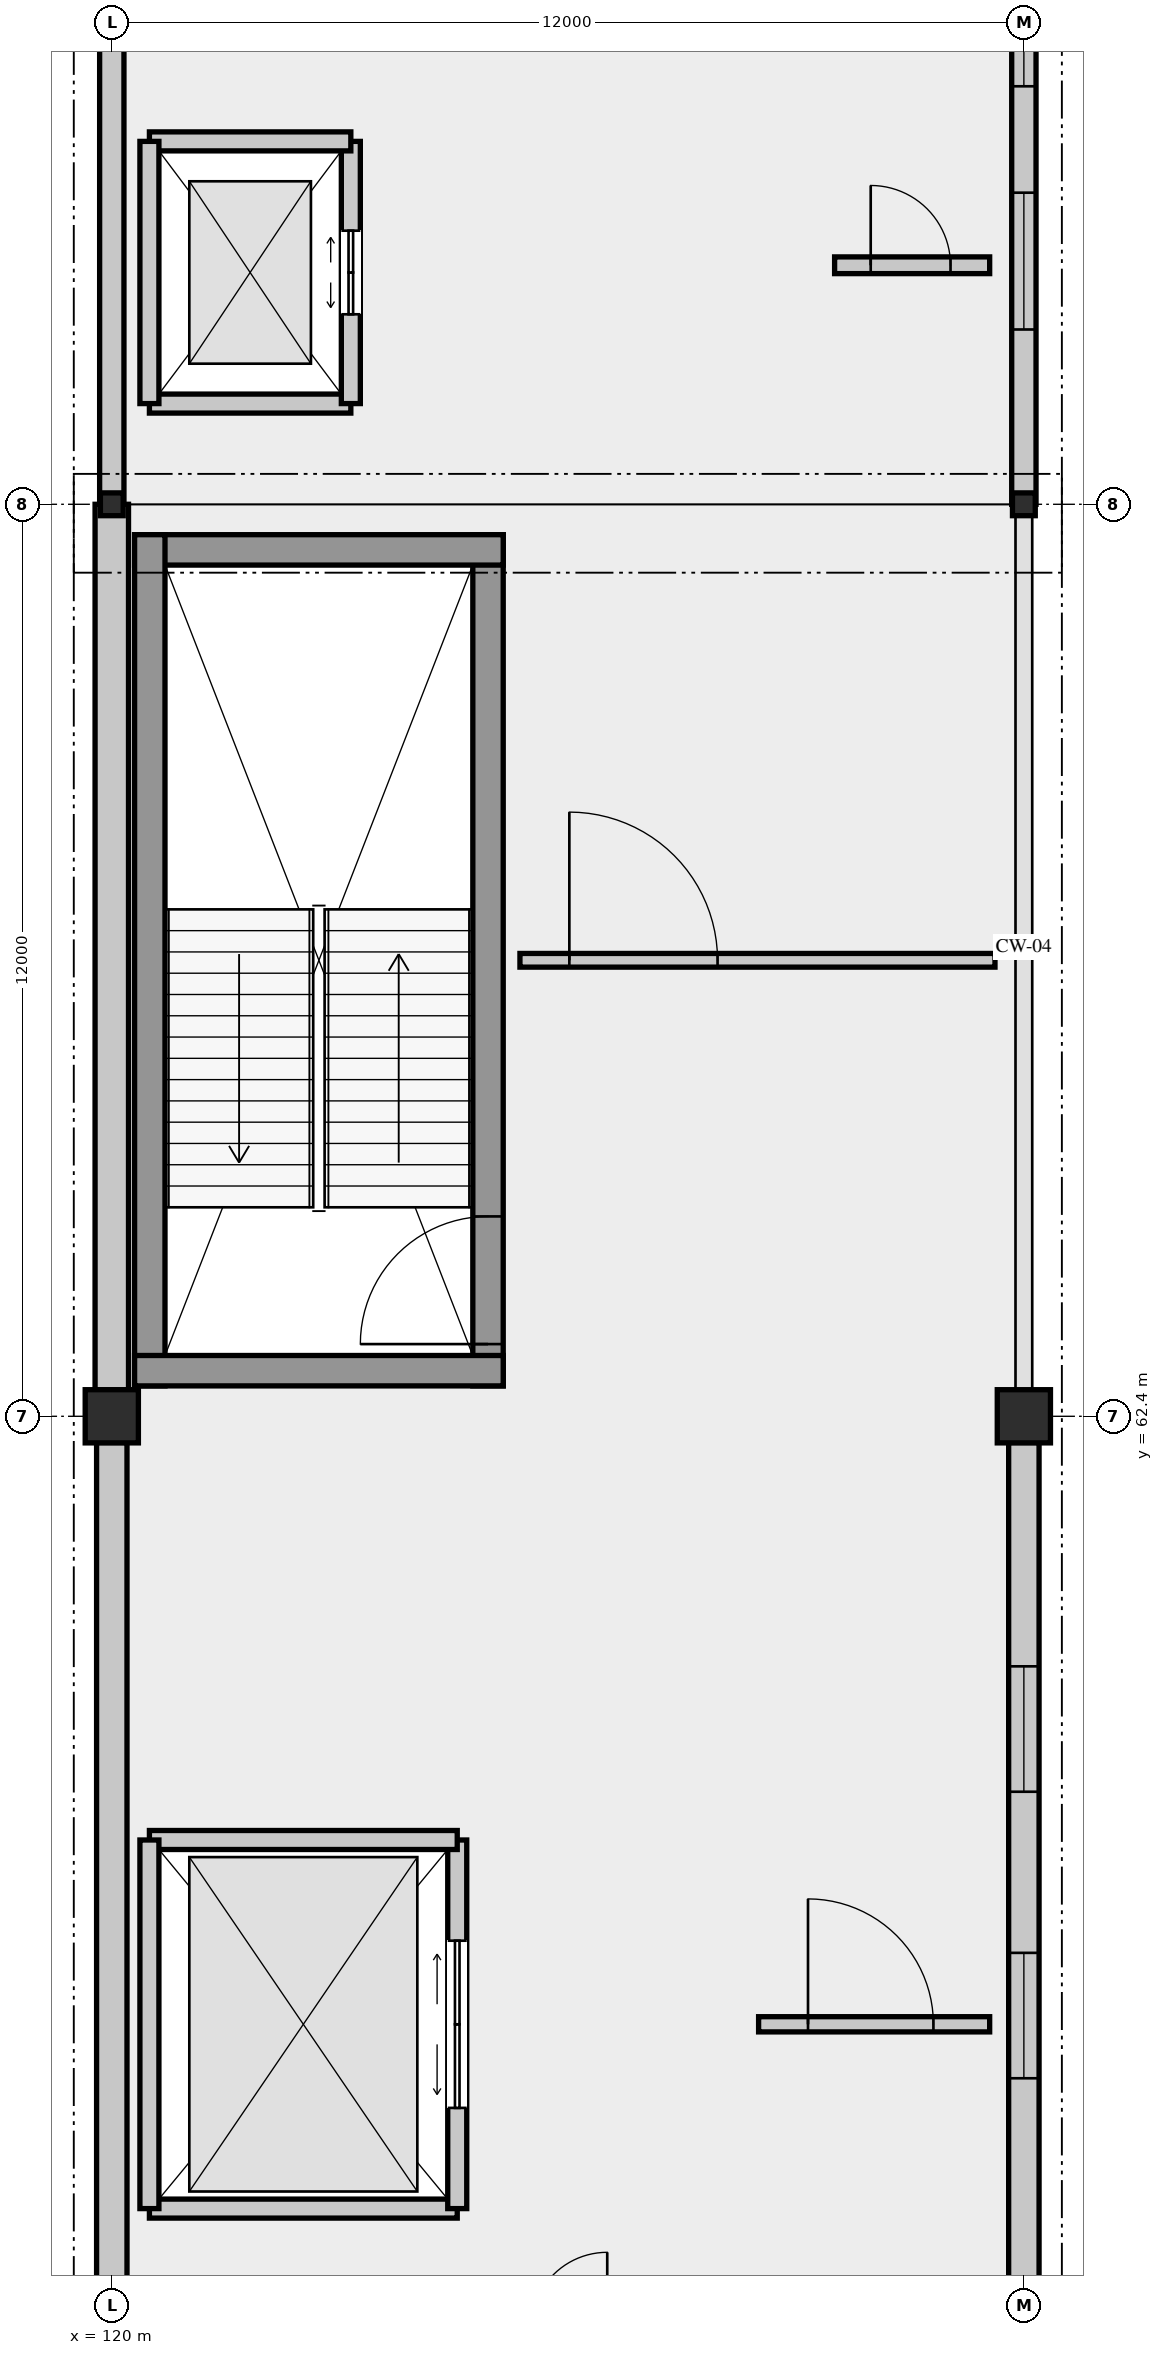
"""IFC4 building model, lengths in metres.
Left out: names, types, materials, properties, quantities, classifications, styles, units other than length and angle.
Written with IfcOpenShell. Run it as: python <this file> out.ifc"""

import sys

from ifc_helpers import new_model, si_unit, direction, frame, frame_2d, origin, origin_2d, place, context, subcontext, project, spatial, rectangle, i_section, extrude, element, fill, save


model = new_model("IFC4")
c1 = context("Model", 3, precision=1e-05, world=origin(), true_north=direction((0.0, 1.0)))
c2 = subcontext(c1, "Body", "Model", "MODEL_VIEW")
j1 = project(units=[si_unit("LENGTHUNIT", "METRE"), si_unit("PLANEANGLEUNIT", "RADIAN")], contexts=[c1])
p1 = place(None, origin())
s1 = spatial("IfcSite", under=j1, at=p1, CompositionType="ELEMENT")
p2 = place(p1, origin())
s2 = spatial("IfcBuilding", under=s1, at=p2, CompositionType="ELEMENT")
p3 = place(p2, frame((0.0, 0.0, 5.4)))
s3 = spatial("IfcBuildingStorey", under=s2, at=p3, CompositionType="ELEMENT", Elevation=5.4)
p4 = place(p3, frame((120.0, 62.4, 0.0), z_axis=(0.0, 0.0, 1.0), x_axis=(1.0, 0.0, 0.0)))
e1 = element("IfcColumn", 1, at=p4, inside=s3, PredefinedType="COLUMN", context=c2, shape_type="SweptSolid", body=[
    extrude(rectangle(XDim=0.7, YDim=0.7, at=origin_2d()), origin(), (0.0, 0.0, 1.0), 5.4),
])
p5 = place(p3, frame((120.0, 74.4, 0.0), z_axis=(0.0, 0.0, 1.0), x_axis=(1.0, 0.0, 0.0)))
e2 = element("IfcColumn", 2, at=p5, inside=s3, PredefinedType="COLUMN", context=c2, shape_type="SweptSolid", body=[
    extrude(i_section(OverallWidth=0.3, OverallDepth=0.3, WebThickness=0.011, FlangeThickness=0.019, FilletRadius=0.027, at=origin_2d()), origin(), (0.0, 0.0, 1.0), 5.4),
])
p6 = place(p3, frame((132.0, 62.4, 0.0), z_axis=(0.0, 0.0, 1.0), x_axis=(1.0, 0.0, 0.0)))
e3 = element("IfcColumn", 3, at=p6, inside=s3, PredefinedType="COLUMN", context=c2, shape_type="SweptSolid", body=[
    extrude(rectangle(XDim=0.7, YDim=0.7, at=origin_2d()), origin(), (0.0, 0.0, 1.0), 5.4),
])
p7 = place(p3, frame((132.0, 74.4, 0.0), z_axis=(0.0, 0.0, 1.0), x_axis=(1.0, 0.0, 0.0)))
e4 = element("IfcColumn", 4, at=p7, inside=s3, PredefinedType="COLUMN", context=c2, shape_type="SweptSolid", body=[
    extrude(i_section(OverallWidth=0.3, OverallDepth=0.3, WebThickness=0.011, FlangeThickness=0.019, FilletRadius=0.027, at=origin_2d()), origin(), (0.0, 0.0, 1.0), 5.4),
])
p8 = place(p3, frame((120.0, 62.055, 0.0), z_axis=(0.0, 0.0, 1.0), x_axis=(0.0, -1.0, 0.0)))
e5 = element("IfcWall", 5, at=p8, inside=s3, PredefinedType="SOLIDWALL", context=c2, shape_type="SweptSolid", body=[
    extrude(rectangle(XDim=11.31, YDim=0.4, at=frame_2d((5.655, 0.0))), origin(), (0.0, 0.0, 1.0), 4.53),
])
p9 = place(p3, frame((132.0, 50.745, 0.0), z_axis=(0.0, 0.0, 1.0), x_axis=(0.0, 1.0, 0.0)))
e6 = element("IfcWall", 6, at=p9, inside=s3, PredefinedType="SOLIDWALL", context=c2, shape_type="SweptSolid", body=[
    extrude(rectangle(XDim=11.31, YDim=0.4, at=frame_2d((5.655, 0.0))), origin(), (0.0, 0.0, 1.0), 4.53),
])
p10 = place(p9, frame((2.945, 0.0, 0.95)))
e7 = element("IfcOpeningElement", 7, at=p10, cuts=e6, PredefinedType="OPENING", context=c2, shape_type="SweptSolid", body=[
    extrude(rectangle(XDim=1.65, YDim=2.1, at=frame_2d((0.825, 1.05))), frame((0.0, 0.21, 0.0), z_axis=(0.0, -1.0, 0.0), x_axis=(1.0, 0.0, 0.0)), (0.0, 0.0, 1.0), 0.42),
])
p11 = place(p9, frame((6.715, 0.0, 0.95)))
e8 = element("IfcOpeningElement", 8, at=p11, cuts=e6, PredefinedType="OPENING", context=c2, shape_type="SweptSolid", body=[
    extrude(rectangle(XDim=1.65, YDim=2.1, at=frame_2d((0.825, 1.05))), frame((0.0, 0.21, 0.0), z_axis=(0.0, -1.0, 0.0), x_axis=(1.0, 0.0, 0.0)), (0.0, 0.0, 1.0), 0.42),
])
p12 = place(p3, frame((120.0, 74.4, 0.0), z_axis=(0.0, 0.0, 1.0), x_axis=(0.0, -1.0, 0.0)))
e9 = element("IfcWall", 9, at=p12, inside=s3, PredefinedType="SOLIDWALL", context=c2, shape_type="SweptSolid", body=[
    extrude(rectangle(XDim=11.655, YDim=0.44, at=frame_2d((5.827, 0.0))), origin(), (0.0, 0.0, 1.0), 4.53),
])
p13 = place(p3, frame((120.0, 84.0, 0.0), z_axis=(0.0, 0.0, 1.0), x_axis=(0.0, -1.0, 0.0)))
e10 = element("IfcWall", 10, at=p13, inside=s3, PredefinedType="SOLIDWALL", context=c2, shape_type="SweptSolid", body=[
    extrude(rectangle(XDim=9.6, YDim=0.32, at=frame_2d((4.8, 0.0))), origin(), (0.0, 0.0, 1.0), 4.53),
])
p14 = place(p3, frame((132.0, 74.4, 0.0), z_axis=(0.0, 0.0, 1.0), x_axis=(0.0, 1.0, 0.0)))
e11 = element("IfcWall", 11, at=p14, inside=s3, PredefinedType="SOLIDWALL", context=c2, shape_type="SweptSolid", body=[
    extrude(rectangle(XDim=9.6, YDim=0.32, at=frame_2d((4.8, 0.0))), origin(), (0.0, 0.0, 1.0), 4.53),
])
p15 = place(p14, frame((2.3, 0.0, 0.95)))
e12 = element("IfcOpeningElement", 12, at=p15, cuts=e11, PredefinedType="OPENING", context=c2, shape_type="SweptSolid", body=[
    extrude(rectangle(XDim=1.8, YDim=2.1, at=frame_2d((0.9, 1.05))), frame((0.0, 0.17, 0.0), z_axis=(0.0, -1.0, 0.0), x_axis=(1.0, 0.0, 0.0)), (0.0, 0.0, 1.0), 0.34),
])
p16 = place(p14, frame((5.5, 0.0, 0.95)))
e13 = element("IfcOpeningElement", 13, at=p16, cuts=e11, PredefinedType="OPENING", context=c2, shape_type="SweptSolid", body=[
    extrude(rectangle(XDim=1.8, YDim=2.1, at=frame_2d((0.9, 1.05))), frame((0.0, 0.17, 0.0), z_axis=(0.0, -1.0, 0.0), x_axis=(1.0, 0.0, 0.0)), (0.0, 0.0, 1.0), 0.34),
])
p17 = place(p3, frame((124.95, 62.8, 0.0), z_axis=(0.0, 0.0, 1.0), x_axis=(0.0, 1.0, 0.0)))
e14 = element("IfcWall", 14, at=p17, inside=s3, PredefinedType="SHEAR", context=c2, shape_type="SweptSolid", body=[
    extrude(rectangle(XDim=11.2, YDim=0.4, at=frame_2d((5.6, 0.0))), origin(), (0.0, 0.0, 1.0), 5.11),
])
p18 = place(p17, frame((0.55, 0.0, 0.0)))
e15 = element("IfcOpeningElement", 15, at=p18, cuts=e14, PredefinedType="OPENING", context=c2, shape_type="SweptSolid", body=[
    extrude(rectangle(XDim=1.68, YDim=2.35, at=frame_2d((0.84, 1.175))), frame((0.0, 0.21, 0.0), z_axis=(0.0, -1.0, 0.0), x_axis=(1.0, 0.0, 0.0)), (0.0, 0.0, 1.0), 0.42),
])
p19 = place(p3, frame((125.15, 73.8, 0.0), z_axis=(0.0, 0.0, 1.0), x_axis=(-1.0, 0.0, 0.0)))
e16 = element("IfcWall", 16, at=p19, inside=s3, PredefinedType="SHEAR", context=c2, shape_type="SweptSolid", body=[
    extrude(rectangle(XDim=4.85, YDim=0.4, at=frame_2d((2.425, 0.0))), origin(), (0.0, 0.0, 1.0), 5.11),
])
p20 = place(p3, frame((120.5, 74.0, 0.0), z_axis=(0.0, 0.0, 1.0), x_axis=(0.0, -1.0, 0.0)))
e17 = element("IfcWall", 17, at=p20, inside=s3, PredefinedType="SHEAR", context=c2, shape_type="SweptSolid", body=[
    extrude(rectangle(XDim=11.2, YDim=0.4, at=frame_2d((5.6, 0.0))), origin(), (0.0, 0.0, 1.0), 5.11),
])
p21 = place(p3, frame((120.3, 63.0, 0.0), z_axis=(0.0, 0.0, 1.0), x_axis=(1.0, 0.0, 0.0)))
e18 = element("IfcWall", 18, at=p21, inside=s3, PredefinedType="SHEAR", context=c2, shape_type="SweptSolid", body=[
    extrude(rectangle(XDim=4.85, YDim=0.4, at=frame_2d((2.425, 0.0))), origin(), (0.0, 0.0, 1.0), 5.11),
])
p22 = place(p3, frame((120.495, 75.725, 0.0), z_axis=(0.0, 0.0, 1.0), x_axis=(1.0, 0.0, 0.0)))
e19 = element("IfcWall", 19, at=p22, inside=s3, PredefinedType="SOLIDWALL", context=c2, shape_type="SweptSolid", body=[
    extrude(rectangle(XDim=2.65, YDim=0.25, at=frame_2d((1.325, 0.0))), origin(), (0.0, 0.0, 1.0), 5.11),
])
p23 = place(p3, frame((123.145, 75.725, 0.0), z_axis=(0.0, 0.0, 1.0), x_axis=(0.0, 1.0, 0.0)))
e20 = element("IfcWall", 20, at=p23, inside=s3, PredefinedType="SOLIDWALL", context=c2, shape_type="SweptSolid", body=[
    extrude(rectangle(XDim=3.45, YDim=0.25, at=frame_2d((1.725, 0.0))), origin(), (0.0, 0.0, 1.0), 5.11),
])
p24 = place(p23, frame((1.175, 0.0, 0.0)))
e21 = element("IfcOpeningElement", 21, at=p24, cuts=e20, PredefinedType="OPENING", context=c2, shape_type="SweptSolid", body=[
    extrude(rectangle(XDim=1.1, YDim=2.2, at=frame_2d((0.55, 1.1))), frame((0.0, 0.135, 0.0), z_axis=(0.0, -1.0, 0.0), x_axis=(1.0, 0.0, 0.0)), (0.0, 0.0, 1.0), 0.27),
])
p25 = place(p3, frame((123.145, 79.175, 0.0), z_axis=(0.0, 0.0, 1.0), x_axis=(-1.0, 0.0, 0.0)))
e22 = element("IfcWall", 22, at=p25, inside=s3, PredefinedType="SOLIDWALL", context=c2, shape_type="SweptSolid", body=[
    extrude(rectangle(XDim=2.65, YDim=0.25, at=frame_2d((1.325, 0.0))), origin(), (0.0, 0.0, 1.0), 5.11),
])
p26 = place(p3, frame((120.495, 79.175, 0.0), z_axis=(0.0, 0.0, 1.0), x_axis=(0.0, -1.0, 0.0)))
e23 = element("IfcWall", 23, at=p26, inside=s3, PredefinedType="SOLIDWALL", context=c2, shape_type="SweptSolid", body=[
    extrude(rectangle(XDim=3.45, YDim=0.25, at=frame_2d((1.725, 0.0))), origin(), (0.0, 0.0, 1.0), 5.11),
])
p27 = place(p3, frame((120.495, 51.975, 0.0), z_axis=(0.0, 0.0, 1.0), x_axis=(1.0, 0.0, 0.0)))
e24 = element("IfcWall", 24, at=p27, inside=s3, PredefinedType="SOLIDWALL", context=c2, shape_type="SweptSolid", body=[
    extrude(rectangle(XDim=4.05, YDim=0.25, at=frame_2d((2.025, 0.0))), origin(), (0.0, 0.0, 1.0), 5.11),
])
p28 = place(p3, frame((124.545, 51.975, 0.0), z_axis=(0.0, 0.0, 1.0), x_axis=(0.0, 1.0, 0.0)))
e25 = element("IfcWall", 25, at=p28, inside=s3, PredefinedType="SOLIDWALL", context=c2, shape_type="SweptSolid", body=[
    extrude(rectangle(XDim=4.85, YDim=0.25, at=frame_2d((2.425, 0.0))), origin(), (0.0, 0.0, 1.0), 5.11),
])
p29 = place(p28, frame((1.325, 0.0, 0.0)))
e26 = element("IfcOpeningElement", 26, at=p29, cuts=e25, PredefinedType="OPENING", context=c2, shape_type="SweptSolid", body=[
    extrude(rectangle(XDim=2.2, YDim=2.65, at=frame_2d((1.1, 1.325))), frame((0.0, 0.135, 0.0), z_axis=(0.0, -1.0, 0.0), x_axis=(1.0, 0.0, 0.0)), (0.0, 0.0, 1.0), 0.27),
])
p30 = place(p3, frame((124.545, 56.825, 0.0), z_axis=(0.0, 0.0, 1.0), x_axis=(-1.0, 0.0, 0.0)))
e27 = element("IfcWall", 27, at=p30, inside=s3, PredefinedType="SOLIDWALL", context=c2, shape_type="SweptSolid", body=[
    extrude(rectangle(XDim=4.05, YDim=0.25, at=frame_2d((2.025, 0.0))), origin(), (0.0, 0.0, 1.0), 5.11),
])
p31 = place(p3, frame((120.495, 56.825, 0.0), z_axis=(0.0, 0.0, 1.0), x_axis=(0.0, -1.0, 0.0)))
e28 = element("IfcWall", 28, at=p31, inside=s3, PredefinedType="SOLIDWALL", context=c2, shape_type="SweptSolid", body=[
    extrude(rectangle(XDim=4.85, YDim=0.25, at=frame_2d((2.425, 0.0))), origin(), (0.0, 0.0, 1.0), 5.11),
])
p32 = place(p3, frame((128.51, 54.4, 0.0), z_axis=(0.0, 0.0, 1.0), x_axis=(1.0, 0.0, 0.0)))
e29 = element("IfcWall", 29, at=p32, inside=s3, PredefinedType="PARTITIONING", context=c2, shape_type="SweptSolid", body=[
    extrude(rectangle(XDim=3.04, YDim=0.2, at=frame_2d((1.52, 0.0))), origin(), (0.0, 0.0, 1.0), 4.64),
])
p33 = place(p32, frame((0.65, 0.0, 0.0)))
e30 = element("IfcOpeningElement", 30, at=p33, cuts=e29, PredefinedType="OPENING", context=c2, shape_type="SweptSolid", body=[
    extrude(rectangle(XDim=1.65, YDim=2.35, at=frame_2d((0.825, 1.175))), frame((0.0, 0.11, 0.0), z_axis=(0.0, -1.0, 0.0), x_axis=(1.0, 0.0, 0.0)), (0.0, 0.0, 1.0), 0.22),
])
p34 = place(p3, frame((125.37, 68.4, 0.0), z_axis=(0.0, 0.0, 1.0), x_axis=(1.0, 0.0, 0.0)))
e31 = element("IfcWall", 31, at=p34, inside=s3, PredefinedType="PARTITIONING", context=c2, shape_type="SweptSolid", body=[
    extrude(rectangle(XDim=6.25, YDim=0.18, at=frame_2d((3.125, 0.0))), origin(), (0.0, 0.0, 1.0), 4.64),
])
p35 = place(p34, frame((0.65, 0.0, 0.0)))
e32 = element("IfcOpeningElement", 32, at=p35, cuts=e31, PredefinedType="OPENING", context=c2, shape_type="SweptSolid", body=[
    extrude(rectangle(XDim=1.95, YDim=2.45, at=frame_2d((0.975, 1.225))), frame((0.0, 0.1, 0.0), z_axis=(0.0, -1.0, 0.0), x_axis=(1.0, 0.0, 0.0)), (0.0, 0.0, 1.0), 0.2),
])
p36 = place(p3, frame((129.51, 77.545, 0.0), z_axis=(0.0, 0.0, 1.0), x_axis=(1.0, 0.0, 0.0)))
e33 = element("IfcWall", 33, at=p36, inside=s3, PredefinedType="PARTITIONING", context=c2, shape_type="SweptSolid", body=[
    extrude(rectangle(XDim=2.04, YDim=0.22, at=frame_2d((1.02, 0.0))), origin(), (0.0, 0.0, 1.0), 4.73),
])
p37 = place(p36, frame((0.475, 0.0, 0.0)))
e34 = element("IfcOpeningElement", 34, at=p37, cuts=e33, PredefinedType="OPENING", context=c2, shape_type="SweptSolid", body=[
    extrude(rectangle(XDim=1.05, YDim=2.2, at=frame_2d((0.525, 1.1))), frame((0.0, 0.12, 0.0), z_axis=(0.0, -1.0, 0.0), x_axis=(1.0, 0.0, 0.0)), (0.0, 0.0, 1.0), 0.24),
])
p38 = place(p10, origin())
e35 = element("IfcWindow", 35, at=p38, inside=s3, PartitioningType="SINGLE_PANEL", PredefinedType="WINDOW", context=c2, shape_type="SweptSolid", body=[
    extrude(rectangle(XDim=1.65, YDim=2.1, at=frame_2d((0.825, 1.05))), frame((0.0, 0.03, 0.0), z_axis=(0.0, -1.0, 0.0), x_axis=(1.0, 0.0, 0.0)), (0.0, 0.0, 1.0), 0.06),
])
fill(e7, e35)
p39 = place(p11, origin())
e36 = element("IfcWindow", 36, at=p39, inside=s3, PartitioningType="SINGLE_PANEL", PredefinedType="WINDOW", context=c2, shape_type="SweptSolid", body=[
    extrude(rectangle(XDim=1.65, YDim=2.1, at=frame_2d((0.825, 1.05))), frame((0.0, 0.03, 0.0), z_axis=(0.0, -1.0, 0.0), x_axis=(1.0, 0.0, 0.0)), (0.0, 0.0, 1.0), 0.06),
])
fill(e8, e36)
p40 = place(p15, origin())
e37 = element("IfcWindow", 37, at=p40, inside=s3, PartitioningType="SINGLE_PANEL", PredefinedType="WINDOW", context=c2, shape_type="SweptSolid", body=[
    extrude(rectangle(XDim=1.8, YDim=2.1, at=frame_2d((0.9, 1.05))), frame((0.0, 0.03, 0.0), z_axis=(0.0, -1.0, 0.0), x_axis=(1.0, 0.0, 0.0)), (0.0, 0.0, 1.0), 0.06),
])
fill(e12, e37)
p41 = place(p16, origin())
e38 = element("IfcWindow", 38, at=p41, inside=s3, PartitioningType="SINGLE_PANEL", PredefinedType="WINDOW", context=c2, shape_type="SweptSolid", body=[
    extrude(rectangle(XDim=1.8, YDim=2.1, at=frame_2d((0.9, 1.05))), frame((0.0, 0.03, 0.0), z_axis=(0.0, -1.0, 0.0), x_axis=(1.0, 0.0, 0.0)), (0.0, 0.0, 1.0), 0.06),
])
fill(e13, e38)
p42 = place(p18, origin())
e39 = element("IfcDoor", 39, at=p42, inside=s3, OperationType="DOUBLE_DOOR_SINGLE_SWING", PredefinedType="DOOR", context=c2, shape_type="SweptSolid", body=[
    extrude(rectangle(XDim=1.68, YDim=2.35, at=frame_2d((0.84, 1.175))), frame((0.0, 0.025, 0.0), z_axis=(0.0, -1.0, 0.0), x_axis=(1.0, 0.0, 0.0)), (0.0, 0.0, 1.0), 0.05),
])
fill(e15, e39)
p43 = place(p24, origin())
e40 = element("IfcDoor", 40, at=p43, inside=s3, OperationType="SLIDING_TO_LEFT", PredefinedType="DOOR", context=c2, shape_type="SweptSolid", body=[
    extrude(rectangle(XDim=1.1, YDim=2.2, at=frame_2d((0.55, 1.1))), frame((0.0, 0.025, 0.0), z_axis=(0.0, -1.0, 0.0), x_axis=(1.0, 0.0, 0.0)), (0.0, 0.0, 1.0), 0.05),
])
fill(e21, e40)
p44 = place(p29, origin())
e41 = element("IfcDoor", 41, at=p44, inside=s3, OperationType="DOUBLE_DOOR_SLIDING", PredefinedType="DOOR", context=c2, shape_type="SweptSolid", body=[
    extrude(rectangle(XDim=2.2, YDim=2.65, at=frame_2d((1.1, 1.325))), frame((0.0, 0.025, 0.0), z_axis=(0.0, -1.0, 0.0), x_axis=(1.0, 0.0, 0.0)), (0.0, 0.0, 1.0), 0.05),
])
fill(e26, e41)
p45 = place(p33, origin())
e42 = element("IfcDoor", 42, at=p45, inside=s3, OperationType="DOUBLE_DOOR_SINGLE_SWING", PredefinedType="DOOR", context=c2, shape_type="SweptSolid", body=[
    extrude(rectangle(XDim=1.65, YDim=2.35, at=frame_2d((0.825, 1.175))), frame((0.0, 0.025, 0.0), z_axis=(0.0, -1.0, 0.0), x_axis=(1.0, 0.0, 0.0)), (0.0, 0.0, 1.0), 0.05),
])
fill(e30, e42)
p46 = place(p35, origin())
e43 = element("IfcDoor", 43, at=p46, inside=s3, OperationType="DOUBLE_DOOR_SINGLE_SWING", PredefinedType="DOOR", context=c2, shape_type="SweptSolid", body=[
    extrude(rectangle(XDim=1.95, YDim=2.45, at=frame_2d((0.975, 1.225))), frame((0.0, 0.025, 0.0), z_axis=(0.0, -1.0, 0.0), x_axis=(1.0, 0.0, 0.0)), (0.0, 0.0, 1.0), 0.05),
])
fill(e32, e43)
p47 = place(p37, origin())
e44 = element("IfcDoor", 44, at=p47, inside=s3, OperationType="SINGLE_SWING_LEFT", PredefinedType="DOOR", context=c2, shape_type="SweptSolid", body=[
    extrude(rectangle(XDim=1.05, YDim=2.2, at=frame_2d((0.525, 1.1))), frame((0.0, 0.025, 0.0), z_axis=(0.0, -1.0, 0.0), x_axis=(1.0, 0.0, 0.0)), (0.0, 0.0, 1.0), 0.05),
])
fill(e34, e44)
save(model, sys.argv[1])
